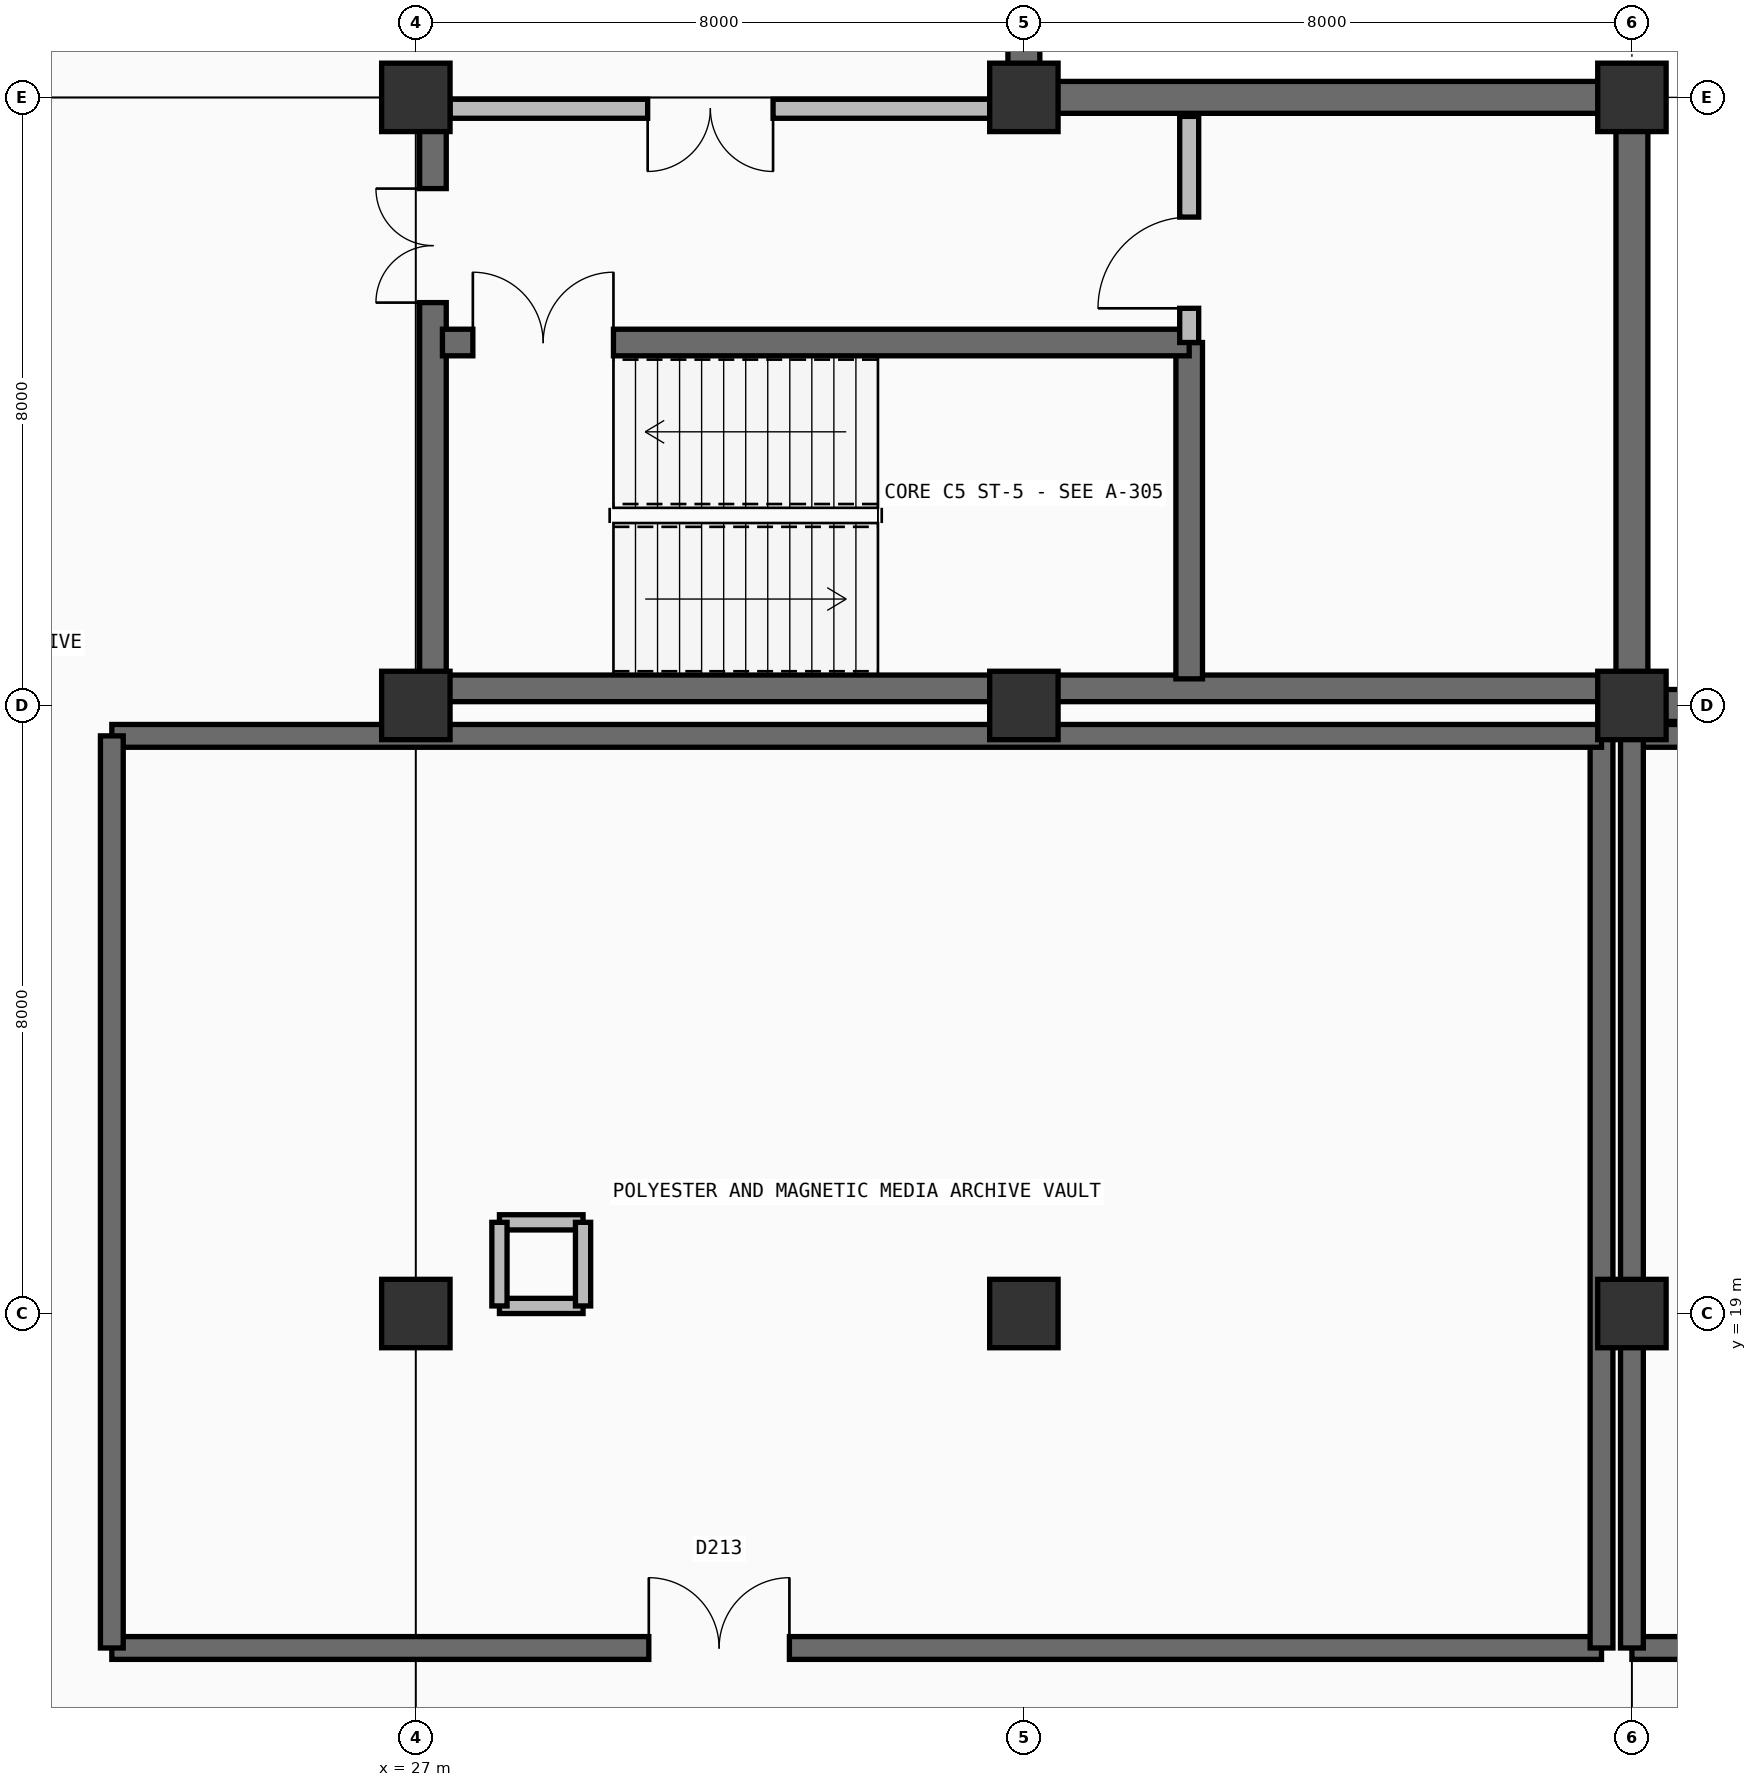
"""IFC4 building model, lengths in metres.
Left out: names, types, materials, properties, quantities, classifications, styles, units other than length and angle.
Written with IfcOpenShell. Run it as: python <this file> out.ifc"""

import sys

from ifc_helpers import new_model, si_unit, direction, frame, frame_2d, origin, origin_2d, place, context, subcontext, project, spatial, rectangle, extrude, element, fill, save


model = new_model("IFC4")
c1 = context("Model", 3, precision=1e-05, world=origin(), true_north=direction((0.0, 1.0)))
c2 = subcontext(c1, "Body", "Model", "MODEL_VIEW")
j1 = project(units=[si_unit("LENGTHUNIT", "METRE"), si_unit("PLANEANGLEUNIT", "RADIAN")], contexts=[c1])
p1 = place(None, origin())
s1 = spatial("IfcSite", under=j1, at=p1, CompositionType="ELEMENT")
p2 = place(p1, origin())
s2 = spatial("IfcBuilding", under=s1, at=p2, CompositionType="ELEMENT")
p3 = place(p2, frame((0.0, 0.0, -4.5)))
s3 = spatial("IfcBuildingStorey", under=s2, at=p3, CompositionType="ELEMENT", Elevation=-4.5)
for number, where, z_axis, x_axis in (
    (1, (27.0, 19.0, -0.6), (0.0, 0.0, 1.0), (1.0, 0.0, 0.0)),
    (2, (27.0, 27.0, -0.6), (0.0, 0.0, 1.0), (1.0, 0.0, 0.0)),
    (3, (27.0, 35.0, -0.6), (0.0, 0.0, 1.0), (1.0, 0.0, 0.0)),
    (4, (35.0, 19.0, -0.6), (0.0, 0.0, 1.0), (1.0, 0.0, 0.0)),
    (5, (35.0, 27.0, -0.6), (0.0, 0.0, 1.0), (1.0, 0.0, 0.0)),
    (6, (35.0, 35.0, -0.6), (0.0, 0.0, 1.0), (1.0, 0.0, 0.0)),
    (7, (43.0, 19.0, -0.6), (0.0, 0.0, 1.0), (1.0, 0.0, 0.0)),
    (8, (43.0, 27.0, -0.6), (0.0, 0.0, 1.0), (1.0, 0.0, 0.0)),
    (9, (43.0, 35.0, -0.6), (0.0, 0.0, 1.0), (1.0, 0.0, 0.0)),
):
    element("IfcColumn", number, at=place(p3, frame(where, z_axis=z_axis, x_axis=x_axis)), inside=s3, PredefinedType="COLUMN", context=c2, shape_type="SweptSolid", body=[
        extrude(rectangle(XDim=0.9, YDim=0.9, at=origin_2d()), origin(), (0.0, 0.0, 1.0), 5.1),
    ])
for number, where, z_axis, x_axis in (
    (10, (35.0, 43.0, 0.0), (0.0, 0.0, 1.0), (0.0, -1.0, 0.0)),
    (11, (35.0, 35.0, 0.0), (0.0, 0.0, 1.0), (1.0, 0.0, 0.0)),
    (12, (43.0, 35.0, 0.0), (0.0, 0.0, 1.0), (0.0, -1.0, 0.0)),
    (13, (43.0, 27.0, 0.0), (0.0, 0.0, 1.0), (1.0, 0.0, 0.0)),
):
    element("IfcWall", number, at=place(p3, frame(where, z_axis=z_axis, x_axis=x_axis)), inside=s3, PredefinedType="USERDEFINED", context=c2, shape_type="SweptSolid", body=[
        extrude(rectangle(XDim=8.0, YDim=0.42, at=frame_2d((4.0, 0.0))), origin(), (0.0, 0.0, 1.0), 4.5),
    ])
p4 = place(p3, frame((27.2, 27.225, 0.0), z_axis=(0.0, 0.0, 1.0), x_axis=(1.0, 0.0, 0.0)))
e14 = element("IfcWall", 14, at=p4, inside=s3, PredefinedType="SHEAR", context=c2, shape_type="SweptSolid", body=[
    extrude(rectangle(XDim=15.6, YDim=0.35, at=frame_2d((7.8, 0.0))), origin(), (0.0, 0.0, 1.0), 4.2),
])
p5 = place(p3, frame((27.225, 27.2, 0.0), z_axis=(0.0, 0.0, 1.0), x_axis=(0.0, 1.0, 0.0)))
e15 = element("IfcWall", 15, at=p5, inside=s3, PredefinedType="SHEAR", context=c2, shape_type="SweptSolid", body=[
    extrude(rectangle(XDim=7.6, YDim=0.35, at=frame_2d((3.8, 0.0))), origin(), (0.0, 0.0, 1.0), 4.2),
])
p6 = place(p5, frame((5.1, 0.0, 0.0)))
e16 = element("IfcOpeningElement", 16, at=p6, cuts=e15, PredefinedType="OPENING", context=c2, shape_type="SweptSolid", body=[
    extrude(rectangle(XDim=1.5, YDim=2.2, at=frame_2d((0.75, 1.1))), frame((0.0, 0.185, 0.0), z_axis=(0.0, -1.0, 0.0), x_axis=(1.0, 0.0, 0.0)), (0.0, 0.0, 1.0), 0.37),
])
p7 = place(p3, frame((37.175, 27.35, 0.0), z_axis=(0.0, 0.0, 1.0), x_axis=(0.0, 1.0, 0.0)))
e17 = element("IfcWall", 17, at=p7, inside=s3, PredefinedType="SHEAR", context=c2, shape_type="SweptSolid", body=[
    extrude(rectangle(XDim=4.425, YDim=0.35, at=frame_2d((2.212, 0.0))), origin(), (0.0, 0.0, 1.0), 4.2),
])
p8 = place(p3, frame((27.35, 31.775, 0.0), z_axis=(0.0, 0.0, 1.0), x_axis=(1.0, 0.0, 0.0)))
e18 = element("IfcWall", 18, at=p8, inside=s3, PredefinedType="SHEAR", context=c2, shape_type="SweptSolid", body=[
    extrude(rectangle(XDim=9.825, YDim=0.35, at=frame_2d((4.913, 0.0))), origin(), (0.0, 0.0, 1.0), 4.2),
])
p9 = place(p8, frame((0.4, 0.0, 0.0)))
e19 = element("IfcOpeningElement", 19, at=p9, cuts=e18, PredefinedType="OPENING", context=c2, shape_type="SweptSolid", body=[
    extrude(rectangle(XDim=1.85, YDim=2.25, at=frame_2d((0.925, 1.125))), frame((0.0, 0.185, 0.0), z_axis=(0.0, -1.0, 0.0), x_axis=(1.0, 0.0, 0.0)), (0.0, 0.0, 1.0), 0.37),
])
p10 = place(p3, frame((37.175, 31.775, 0.0), z_axis=(0.0, 0.0, 1.0), x_axis=(0.0, 1.0, 0.0)))
e20 = element("IfcWall", 20, at=p10, inside=s3, PredefinedType="PARTITIONING", context=c2, shape_type="SweptSolid", body=[
    extrude(rectangle(XDim=2.975, YDim=0.25, at=frame_2d((1.488, 0.0))), origin(), (0.0, 0.0, 1.0), 4.2),
])
p11 = place(p10, frame((0.45, 0.0, 0.0)))
e21 = element("IfcOpeningElement", 21, at=p11, cuts=e20, PredefinedType="OPENING", context=c2, shape_type="SweptSolid", body=[
    extrude(rectangle(XDim=1.2, YDim=2.2, at=frame_2d((0.6, 1.1))), frame((0.0, 0.135, 0.0), z_axis=(0.0, -1.0, 0.0), x_axis=(1.0, 0.0, 0.0)), (0.0, 0.0, 1.0), 0.27),
])
p12 = place(p3, frame((27.45, 34.85, 0.0), z_axis=(0.0, 0.0, 1.0), x_axis=(1.0, 0.0, 0.0)))
e22 = element("IfcWall", 22, at=p12, inside=s3, PredefinedType="PARTITIONING", context=c2, shape_type="SweptSolid", body=[
    extrude(rectangle(XDim=7.1, YDim=0.25, at=frame_2d((3.55, 0.0))), origin(), (0.0, 0.0, 1.0), 3.435),
])
p13 = place(p12, frame((2.6, 0.0, 0.0)))
e23 = element("IfcOpeningElement", 23, at=p13, cuts=e22, PredefinedType="OPENING", context=c2, shape_type="SweptSolid", body=[
    extrude(rectangle(XDim=1.65, YDim=2.25, at=frame_2d((0.825, 1.125))), frame((0.0, 0.135, 0.0), z_axis=(0.0, -1.0, 0.0), x_axis=(1.0, 0.0, 0.0)), (0.0, 0.0, 1.0), 0.27),
])
p14 = place(p3, frame((23.0, 14.6, 0.0), z_axis=(0.0, 0.0, 1.0), x_axis=(1.0, 0.0, 0.0)))
e24 = element("IfcWall", 24, at=p14, inside=s3, PredefinedType="SHEAR", context=c2, shape_type="SweptSolid", body=[
    extrude(rectangle(XDim=19.6, YDim=0.3, at=frame_2d((9.8, 0.0))), origin(), (0.0, 0.0, 1.0), 4.2),
])
p15 = place(p14, frame((7.065, 0.0, 0.0)))
e25 = element("IfcOpeningElement", 25, at=p15, cuts=e24, PredefinedType="OPENING", context=c2, shape_type="SweptSolid", body=[
    extrude(rectangle(XDim=1.85, YDim=2.25, at=frame_2d((0.925, 1.125))), frame((0.0, 0.16, 0.0), z_axis=(0.0, -1.0, 0.0), x_axis=(1.0, 0.0, 0.0)), (0.0, 0.0, 1.0), 0.32),
])
p16 = place(p3, frame((42.6, 14.6, 0.0), z_axis=(0.0, 0.0, 1.0), x_axis=(0.0, 1.0, 0.0)))
e26 = element("IfcWall", 26, at=p16, inside=s3, PredefinedType="SHEAR", context=c2, shape_type="SweptSolid", body=[
    extrude(rectangle(XDim=12.0, YDim=0.3, at=frame_2d((6.0, 0.0))), origin(), (0.0, 0.0, 1.0), 4.2),
])
p17 = place(p3, frame((23.0, 26.6, 0.0), z_axis=(0.0, 0.0, 1.0), x_axis=(1.0, 0.0, 0.0)))
e27 = element("IfcWall", 27, at=p17, inside=s3, PredefinedType="SHEAR", context=c2, shape_type="SweptSolid", body=[
    extrude(rectangle(XDim=19.6, YDim=0.3, at=frame_2d((9.8, 0.0))), origin(), (0.0, 0.0, 1.0), 4.2),
])
p18 = place(p3, frame((23.0, 14.6, 0.0), z_axis=(0.0, 0.0, 1.0), x_axis=(0.0, 1.0, 0.0)))
e28 = element("IfcWall", 28, at=p18, inside=s3, PredefinedType="SHEAR", context=c2, shape_type="SweptSolid", body=[
    extrude(rectangle(XDim=12.0, YDim=0.3, at=frame_2d((6.0, 0.0))), origin(), (0.0, 0.0, 1.0), 4.2),
])
p19 = place(p3, frame((43.0, 14.6, 0.0), z_axis=(0.0, 0.0, 1.0), x_axis=(1.0, 0.0, 0.0)))
e29 = element("IfcWall", 29, at=p19, inside=s3, PredefinedType="SHEAR", context=c2, shape_type="SweptSolid", body=[
    extrude(rectangle(XDim=27.0, YDim=0.3, at=frame_2d((13.5, 0.0))), origin(), (0.0, 0.0, 1.0), 4.2),
])
p20 = place(p19, frame((11.122, 0.0, 0.0)))
e30 = element("IfcOpeningElement", 30, at=p20, cuts=e29, PredefinedType="OPENING", context=c2, shape_type="SweptSolid", body=[
    extrude(rectangle(XDim=1.75, YDim=2.28, at=frame_2d((0.875, 1.14))), frame((0.0, 0.16, 0.0), z_axis=(0.0, -1.0, 0.0), x_axis=(1.0, 0.0, 0.0)), (0.0, 0.0, 1.0), 0.32),
])
p21 = place(p3, frame((43.0, 26.6, 0.0), z_axis=(0.0, 0.0, 1.0), x_axis=(1.0, 0.0, 0.0)))
e31 = element("IfcWall", 31, at=p21, inside=s3, PredefinedType="SHEAR", context=c2, shape_type="SweptSolid", body=[
    extrude(rectangle(XDim=27.0, YDim=0.3, at=frame_2d((13.5, 0.0))), origin(), (0.0, 0.0, 1.0), 4.2),
])
p22 = place(p3, frame((43.0, 14.6, 0.0), z_axis=(0.0, 0.0, 1.0), x_axis=(0.0, 1.0, 0.0)))
e32 = element("IfcWall", 32, at=p22, inside=s3, PredefinedType="SHEAR", context=c2, shape_type="SweptSolid", body=[
    extrude(rectangle(XDim=12.0, YDim=0.3, at=frame_2d((6.0, 0.0))), origin(), (0.0, 0.0, 1.0), 4.2),
])
p23 = place(p3, frame((28.1, 19.1, 0.0), z_axis=(0.0, 0.0, 1.0), x_axis=(1.0, 0.0, 0.0)))
e33 = element("IfcWall", 33, at=p23, inside=s3, PredefinedType="PARTITIONING", context=c2, shape_type="SweptSolid", body=[
    extrude(rectangle(XDim=1.1, YDim=0.2, at=frame_2d((0.55, 0.0))), origin(), (0.0, 0.0, 1.0), 3.435),
])
for number, where, z_axis, x_axis in (
    (34, (28.1, 20.2, 0.0), (0.0, 0.0, 1.0), (1.0, 0.0, 0.0)),
    (35, (28.1, 19.1, 0.0), (0.0, 0.0, 1.0), (0.0, 1.0, 0.0)),
    (36, (29.2, 19.1, 0.0), (0.0, 0.0, 1.0), (0.0, 1.0, 0.0)),
):
    element("IfcWall", number, at=place(p3, frame(where, z_axis=z_axis, x_axis=x_axis)), inside=s3, PredefinedType="PARTITIONING", context=c2, shape_type="SweptSolid", body=[
        extrude(rectangle(XDim=1.1, YDim=0.2, at=frame_2d((0.55, 0.0))), origin(), (0.0, 0.0, 1.0), 4.2),
    ])
p24 = place(p9, origin())
e37 = element("IfcDoor", 37, at=p24, inside=s3, OperationType="DOUBLE_DOOR_SINGLE_SWING", PredefinedType="DOOR", context=c2, shape_type="SweptSolid", body=[
    extrude(rectangle(XDim=1.85, YDim=2.25, at=frame_2d((0.925, 1.125))), frame((0.0, 0.025, 0.0), z_axis=(0.0, -1.0, 0.0), x_axis=(1.0, 0.0, 0.0)), (0.0, 0.0, 1.0), 0.05),
])
fill(e19, e37)
p25 = place(p11, origin())
e38 = element("IfcDoor", 38, at=p25, inside=s3, OperationType="SINGLE_SWING_LEFT", PredefinedType="DOOR", context=c2, shape_type="SweptSolid", body=[
    extrude(rectangle(XDim=1.2, YDim=2.2, at=frame_2d((0.6, 1.1))), frame((0.0, 0.025, 0.0), z_axis=(0.0, -1.0, 0.0), x_axis=(1.0, 0.0, 0.0)), (0.0, 0.0, 1.0), 0.05),
])
fill(e21, e38)
p26 = place(p13, frame((1.65, 0.0, 0.0), z_axis=(0.0, 0.0, 1.0), x_axis=(-1.0, 0.0, 0.0)))
e39 = element("IfcDoor", 39, at=p26, inside=s3, OperationType="DOUBLE_DOOR_SINGLE_SWING", PredefinedType="DOOR", context=c2, shape_type="SweptSolid", body=[
    extrude(rectangle(XDim=1.65, YDim=2.25, at=frame_2d((0.825, 1.125))), frame((0.0, 0.025, 0.0), z_axis=(0.0, -1.0, 0.0), x_axis=(1.0, 0.0, 0.0)), (0.0, 0.0, 1.0), 0.05),
])
fill(e23, e39)
p27 = place(p6, origin())
e40 = element("IfcDoor", 40, at=p27, inside=s3, OperationType="DOUBLE_DOOR_SINGLE_SWING", PredefinedType="DOOR", context=c2, shape_type="SweptSolid", body=[
    extrude(rectangle(XDim=1.5, YDim=2.2, at=frame_2d((0.75, 1.1))), frame((0.0, 0.025, 0.0), z_axis=(0.0, -1.0, 0.0), x_axis=(1.0, 0.0, 0.0)), (0.0, 0.0, 1.0), 0.05),
])
fill(e16, e40)
p28 = place(p15, origin())
e41 = element("IfcDoor", 41, at=p28, inside=s3, OperationType="DOUBLE_DOOR_SINGLE_SWING", PredefinedType="DOOR", context=c2, shape_type="SweptSolid", body=[
    extrude(rectangle(XDim=1.85, YDim=2.25, at=frame_2d((0.925, 1.125))), frame((0.0, 0.025, 0.0), z_axis=(0.0, -1.0, 0.0), x_axis=(1.0, 0.0, 0.0)), (0.0, 0.0, 1.0), 0.05),
])
fill(e25, e41)
save(model, sys.argv[1])
